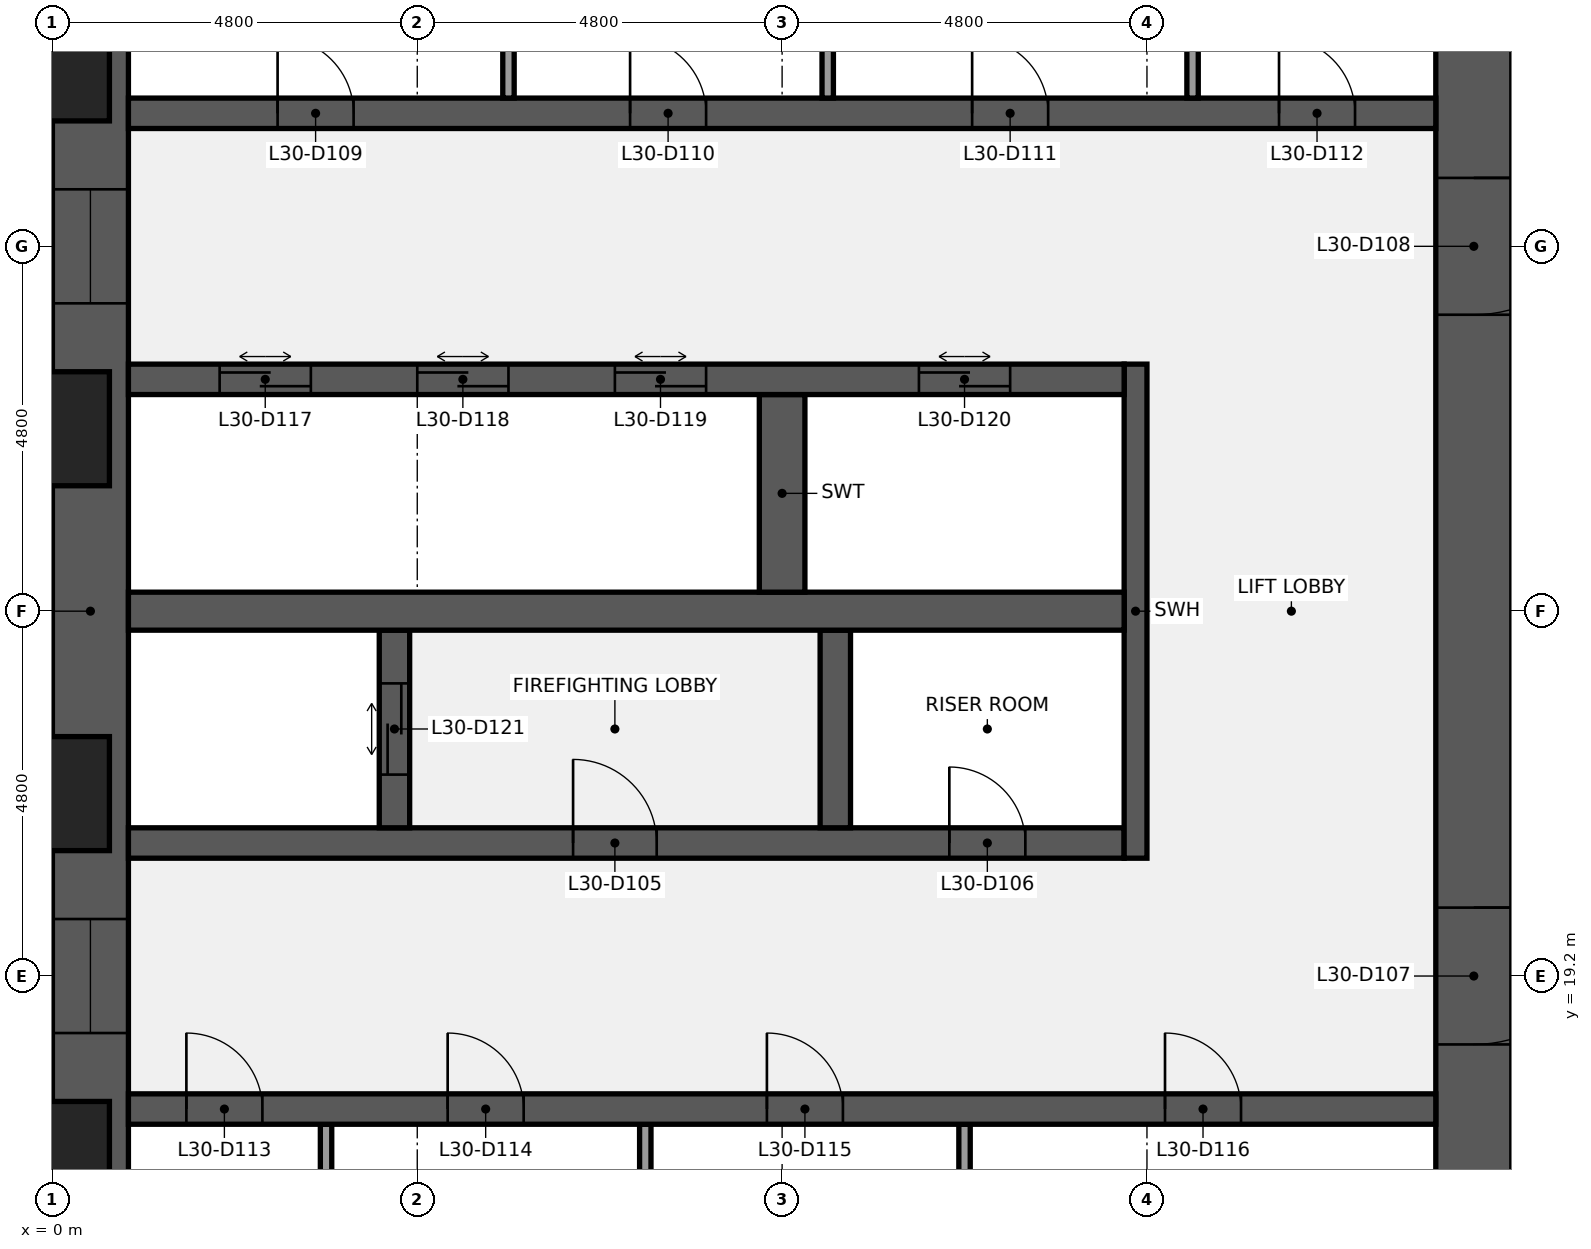
"""IFC4 building model, lengths in metres.
Left out: names, types, materials, properties, quantities, classifications, styles, units other than length and angle.
Written with IfcOpenShell. Run it as: python <this file> out.ifc"""

import sys

from ifc_helpers import new_model, si_unit, direction, frame, frame_2d, origin, place, context, subcontext, project, spatial, rectangle, extrude, element, fill, save


model = new_model("IFC4")
c1 = context("Model", 3, precision=1e-05, world=origin(), true_north=direction((0.0, 1.0)))
c2 = subcontext(c1, "Body", "Model", "MODEL_VIEW")
j1 = project(units=[si_unit("LENGTHUNIT", "METRE"), si_unit("PLANEANGLEUNIT", "RADIAN")], contexts=[c1])
p1 = place(None, origin())
s1 = spatial("IfcSite", under=j1, at=p1, CompositionType="ELEMENT")
p2 = place(p1, origin())
s2 = spatial("IfcBuilding", under=s1, at=p2, CompositionType="ELEMENT")
p3 = place(p2, frame((0.0, 0.0, 140.1)))
s3 = spatial("IfcBuildingStorey", under=s2, at=p3, CompositionType="ELEMENT", Elevation=140.1)
p4 = place(p3, frame((0.5, 9.6, 0.0), z_axis=(0.0, 0.0, 1.0), x_axis=(0.0, 1.0, 0.0)))
e1 = element("IfcWall", 1, at=p4, inside=s3, PredefinedType="SHEAR", context=c2, shape_type="SweptSolid", body=[
    extrude(rectangle(XDim=28.8, YDim=1.0, at=frame_2d((14.4, 0.0))), origin(), (0.0, 0.0, 1.0), 3.84),
])
p5 = place(p4, frame((8.85, 0.0, 0.9)))
e2 = element("IfcOpeningElement", 2, at=p5, cuts=e1, PredefinedType="OPENING", context=c2, shape_type="SweptSolid", body=[
    extrude(rectangle(XDim=1.5, YDim=1.5, at=frame_2d((0.75, 0.75))), frame((0.0, 0.51, 0.0), z_axis=(0.0, -1.0, 0.0), x_axis=(1.0, 0.0, 0.0)), (0.0, 0.0, 1.0), 1.02),
])
p6 = place(p4, frame((18.45, 0.0, 0.9)))
e3 = element("IfcOpeningElement", 3, at=p6, cuts=e1, PredefinedType="OPENING", context=c2, shape_type="SweptSolid", body=[
    extrude(rectangle(XDim=1.5, YDim=1.5, at=frame_2d((0.75, 0.75))), frame((0.0, 0.51, 0.0), z_axis=(0.0, -1.0, 0.0), x_axis=(1.0, 0.0, 0.0)), (0.0, 0.0, 1.0), 1.02),
])
p7 = place(p3, frame((18.7, 38.4, 0.0), z_axis=(0.0, 0.0, 1.0), x_axis=(0.0, -1.0, 0.0)))
e4 = element("IfcWall", 4, at=p7, inside=s3, PredefinedType="SHEAR", context=c2, shape_type="SweptSolid", body=[
    extrude(rectangle(XDim=28.8, YDim=1.0, at=frame_2d((14.4, 0.0))), origin(), (0.0, 0.0, 1.0), 3.84),
])
p8 = place(p7, frame((18.3, 0.0, 0.0)))
e5 = element("IfcOpeningElement", 5, at=p8, cuts=e4, PredefinedType="OPENING", context=c2, shape_type="SweptSolid", body=[
    extrude(rectangle(XDim=1.8, YDim=2.1, at=frame_2d((0.9, 1.05))), frame((0.0, 0.51, 0.0), z_axis=(0.0, -1.0, 0.0), x_axis=(1.0, 0.0, 0.0)), (0.0, 0.0, 1.0), 1.02),
])
p9 = place(p7, frame((8.7, 0.0, 0.0)))
e6 = element("IfcOpeningElement", 6, at=p9, cuts=e4, PredefinedType="OPENING", context=c2, shape_type="SweptSolid", body=[
    extrude(rectangle(XDim=1.8, YDim=2.1, at=frame_2d((0.9, 1.05))), frame((0.0, 0.51, 0.0), z_axis=(0.0, -1.0, 0.0), x_axis=(1.0, 0.0, 0.0)), (0.0, 0.0, 1.0), 1.02),
])
for number, where, z_axis, x_axis in (
    (7, (3.6, 14.65, 0.0), (0.0, 0.0, 1.0), (0.0, 1.0, 0.0)),
    (8, (7.8, 14.65, 0.0), (0.0, 0.0, 1.0), (0.0, 1.0, 0.0)),
    (9, (12.0, 14.65, 0.0), (0.0, 0.0, 1.0), (0.0, 1.0, 0.0)),
):
    element("IfcWall", number, at=place(p3, frame(where, z_axis=z_axis, x_axis=x_axis)), inside=s3, PredefinedType="PARTITIONING", context=c2, shape_type="SweptSolid", body=[
        extrude(rectangle(XDim=2.6, YDim=0.15, at=frame_2d((1.3, 0.0))), origin(), (0.0, 0.0, 1.0), 3.84),
    ])
p10 = place(p3, frame((1.0, 17.45, 0.0), z_axis=(0.0, 0.0, 1.0), x_axis=(1.0, 0.0, 0.0)))
e10 = element("IfcWall", 10, at=p10, inside=s3, PredefinedType="SHEAR", context=c2, shape_type="SweptSolid", body=[
    extrude(rectangle(XDim=17.2, YDim=0.4, at=frame_2d((8.6, 0.0))), origin(), (0.0, 0.0, 1.0), 3.84),
])
p11 = place(p10, frame((0.762, 0.0, 0.0)))
e11 = element("IfcOpeningElement", 11, at=p11, cuts=e10, PredefinedType="OPENING", context=c2, shape_type="SweptSolid", body=[
    extrude(rectangle(XDim=1.0, YDim=2.1, at=frame_2d((0.5, 1.05))), frame((0.0, 0.21, 0.0), z_axis=(0.0, -1.0, 0.0), x_axis=(1.0, 0.0, 0.0)), (0.0, 0.0, 1.0), 0.42),
])
p12 = place(p10, frame((4.2, 0.0, 0.0)))
e12 = element("IfcOpeningElement", 12, at=p12, cuts=e10, PredefinedType="OPENING", context=c2, shape_type="SweptSolid", body=[
    extrude(rectangle(XDim=1.0, YDim=2.1, at=frame_2d((0.5, 1.05))), frame((0.0, 0.21, 0.0), z_axis=(0.0, -1.0, 0.0), x_axis=(1.0, 0.0, 0.0)), (0.0, 0.0, 1.0), 0.42),
])
p13 = place(p10, frame((8.4, 0.0, 0.0)))
e13 = element("IfcOpeningElement", 13, at=p13, cuts=e10, PredefinedType="OPENING", context=c2, shape_type="SweptSolid", body=[
    extrude(rectangle(XDim=1.0, YDim=2.1, at=frame_2d((0.5, 1.05))), frame((0.0, 0.21, 0.0), z_axis=(0.0, -1.0, 0.0), x_axis=(1.0, 0.0, 0.0)), (0.0, 0.0, 1.0), 0.42),
])
p14 = place(p10, frame((13.637, 0.0, 0.0)))
e14 = element("IfcOpeningElement", 14, at=p14, cuts=e10, PredefinedType="OPENING", context=c2, shape_type="SweptSolid", body=[
    extrude(rectangle(XDim=1.0, YDim=2.1, at=frame_2d((0.5, 1.05))), frame((0.0, 0.21, 0.0), z_axis=(0.0, -1.0, 0.0), x_axis=(1.0, 0.0, 0.0)), (0.0, 0.0, 1.0), 0.42),
])
p15 = place(p3, frame((1.0, 20.95, 0.0), z_axis=(0.0, 0.0, 1.0), x_axis=(1.0, 0.0, 0.0)))
e15 = element("IfcWall", 15, at=p15, inside=s3, PredefinedType="SHEAR", context=c2, shape_type="SweptSolid", body=[
    extrude(rectangle(XDim=13.1, YDim=0.4, at=frame_2d((6.55, 0.0))), origin(), (0.0, 0.0, 1.0), 3.84),
])
p16 = place(p15, frame((5.85, 0.0, 0.0)))
e16 = element("IfcOpeningElement", 16, at=p16, cuts=e15, PredefinedType="OPENING", context=c2, shape_type="SweptSolid", body=[
    extrude(rectangle(XDim=1.1, YDim=2.1, at=frame_2d((0.55, 1.05))), frame((0.0, 0.21, 0.0), z_axis=(0.0, -1.0, 0.0), x_axis=(1.0, 0.0, 0.0)), (0.0, 0.0, 1.0), 0.42),
])
p17 = place(p15, frame((10.8, 0.0, 0.0)))
e17 = element("IfcOpeningElement", 17, at=p17, cuts=e15, PredefinedType="OPENING", context=c2, shape_type="SweptSolid", body=[
    extrude(rectangle(XDim=1.0, YDim=2.1, at=frame_2d((0.5, 1.05))), frame((0.0, 0.21, 0.0), z_axis=(0.0, -1.0, 0.0), x_axis=(1.0, 0.0, 0.0)), (0.0, 0.0, 1.0), 0.42),
])
p18 = place(p3, frame((14.25, 20.75, 0.0), z_axis=(0.0, 0.0, 1.0), x_axis=(0.0, 1.0, 0.0)))
e18 = element("IfcWall", 18, at=p18, inside=s3, PredefinedType="SHEAR", context=c2, shape_type="SweptSolid", body=[
    extrude(rectangle(XDim=6.5, YDim=0.3, at=frame_2d((3.25, 0.0))), origin(), (0.0, 0.0, 1.0), 3.84),
])
p19 = place(p3, frame((4.5, 21.15, 0.0), z_axis=(0.0, 0.0, 1.0), x_axis=(0.0, 1.0, 0.0)))
e19 = element("IfcWall", 19, at=p19, inside=s3, PredefinedType="SHEAR", context=c2, shape_type="SweptSolid", body=[
    extrude(rectangle(XDim=2.6, YDim=0.4, at=frame_2d((1.3, 0.0))), origin(), (0.0, 0.0, 1.0), 3.84),
])
p20 = place(p19, frame((0.7, 0.0, 0.0)))
e20 = element("IfcOpeningElement", 20, at=p20, cuts=e19, PredefinedType="OPENING", context=c2, shape_type="SweptSolid", body=[
    extrude(rectangle(XDim=1.2, YDim=2.1, at=frame_2d((0.6, 1.05))), frame((0.0, 0.21, 0.0), z_axis=(0.0, -1.0, 0.0), x_axis=(1.0, 0.0, 0.0)), (0.0, 0.0, 1.0), 0.42),
])
p21 = place(p3, frame((10.3, 21.15, 0.0), z_axis=(0.0, 0.0, 1.0), x_axis=(0.0, 1.0, 0.0)))
e21 = element("IfcWall", 21, at=p21, inside=s3, PredefinedType="SHEAR", context=c2, shape_type="SweptSolid", body=[
    extrude(rectangle(XDim=2.6, YDim=0.4, at=frame_2d((1.3, 0.0))), origin(), (0.0, 0.0, 1.0), 3.84),
])
p22 = place(p3, frame((1.0, 24.0, 0.0), z_axis=(0.0, 0.0, 1.0), x_axis=(1.0, 0.0, 0.0)))
e22 = element("IfcWall", 22, at=p22, inside=s3, PredefinedType="SHEAR", context=c2, shape_type="SweptSolid", body=[
    extrude(rectangle(XDim=13.1, YDim=0.5, at=frame_2d((6.55, 0.0))), origin(), (0.0, 0.0, 1.0), 3.84),
])
p23 = place(p3, frame((9.6, 24.25, 0.0), z_axis=(0.0, 0.0, 1.0), x_axis=(0.0, 1.0, 0.0)))
e23 = element("IfcWall", 23, at=p23, inside=s3, PredefinedType="SHEAR", context=c2, shape_type="SweptSolid", body=[
    extrude(rectangle(XDim=2.6, YDim=0.6, at=frame_2d((1.3, 0.0))), origin(), (0.0, 0.0, 1.0), 3.84),
])
p24 = place(p3, frame((1.0, 27.05, 0.0), z_axis=(0.0, 0.0, 1.0), x_axis=(1.0, 0.0, 0.0)))
e24 = element("IfcWall", 24, at=p24, inside=s3, PredefinedType="SHEAR", context=c2, shape_type="SweptSolid", body=[
    extrude(rectangle(XDim=13.1, YDim=0.4, at=frame_2d((6.55, 0.0))), origin(), (0.0, 0.0, 1.0), 3.84),
])
p25 = place(p24, frame((1.2, 0.0, 0.0)))
e25 = element("IfcOpeningElement", 25, at=p25, cuts=e24, PredefinedType="OPENING", context=c2, shape_type="SweptSolid", body=[
    extrude(rectangle(XDim=1.2, YDim=2.1, at=frame_2d((0.6, 1.05))), frame((0.0, 0.21, 0.0), z_axis=(0.0, -1.0, 0.0), x_axis=(1.0, 0.0, 0.0)), (0.0, 0.0, 1.0), 0.42),
])
p26 = place(p24, frame((3.8, 0.0, 0.0)))
e26 = element("IfcOpeningElement", 26, at=p26, cuts=e24, PredefinedType="OPENING", context=c2, shape_type="SweptSolid", body=[
    extrude(rectangle(XDim=1.2, YDim=2.1, at=frame_2d((0.6, 1.05))), frame((0.0, 0.21, 0.0), z_axis=(0.0, -1.0, 0.0), x_axis=(1.0, 0.0, 0.0)), (0.0, 0.0, 1.0), 0.42),
])
p27 = place(p24, frame((6.4, 0.0, 0.0)))
e27 = element("IfcOpeningElement", 27, at=p27, cuts=e24, PredefinedType="OPENING", context=c2, shape_type="SweptSolid", body=[
    extrude(rectangle(XDim=1.2, YDim=2.1, at=frame_2d((0.6, 1.05))), frame((0.0, 0.21, 0.0), z_axis=(0.0, -1.0, 0.0), x_axis=(1.0, 0.0, 0.0)), (0.0, 0.0, 1.0), 0.42),
])
p28 = place(p24, frame((10.4, 0.0, 0.0)))
e28 = element("IfcOpeningElement", 28, at=p28, cuts=e24, PredefinedType="OPENING", context=c2, shape_type="SweptSolid", body=[
    extrude(rectangle(XDim=1.2, YDim=2.1, at=frame_2d((0.6, 1.05))), frame((0.0, 0.21, 0.0), z_axis=(0.0, -1.0, 0.0), x_axis=(1.0, 0.0, 0.0)), (0.0, 0.0, 1.0), 0.42),
])
p29 = place(p3, frame((1.0, 30.55, 0.0), z_axis=(0.0, 0.0, 1.0), x_axis=(1.0, 0.0, 0.0)))
e29 = element("IfcWall", 29, at=p29, inside=s3, PredefinedType="SHEAR", context=c2, shape_type="SweptSolid", body=[
    extrude(rectangle(XDim=17.2, YDim=0.4, at=frame_2d((8.6, 0.0))), origin(), (0.0, 0.0, 1.0), 3.84),
])
p30 = place(p29, frame((1.962, 0.0, 0.0)))
e30 = element("IfcOpeningElement", 30, at=p30, cuts=e29, PredefinedType="OPENING", context=c2, shape_type="SweptSolid", body=[
    extrude(rectangle(XDim=1.0, YDim=2.1, at=frame_2d((0.5, 1.05))), frame((0.0, 0.21, 0.0), z_axis=(0.0, -1.0, 0.0), x_axis=(1.0, 0.0, 0.0)), (0.0, 0.0, 1.0), 0.42),
])
p31 = place(p29, frame((6.6, 0.0, 0.0)))
e31 = element("IfcOpeningElement", 31, at=p31, cuts=e29, PredefinedType="OPENING", context=c2, shape_type="SweptSolid", body=[
    extrude(rectangle(XDim=1.0, YDim=2.1, at=frame_2d((0.5, 1.05))), frame((0.0, 0.21, 0.0), z_axis=(0.0, -1.0, 0.0), x_axis=(1.0, 0.0, 0.0)), (0.0, 0.0, 1.0), 0.42),
])
p32 = place(p29, frame((11.1, 0.0, 0.0)))
e32 = element("IfcOpeningElement", 32, at=p32, cuts=e29, PredefinedType="OPENING", context=c2, shape_type="SweptSolid", body=[
    extrude(rectangle(XDim=1.0, YDim=2.1, at=frame_2d((0.5, 1.05))), frame((0.0, 0.21, 0.0), z_axis=(0.0, -1.0, 0.0), x_axis=(1.0, 0.0, 0.0)), (0.0, 0.0, 1.0), 0.42),
])
p33 = place(p29, frame((15.137, 0.0, 0.0)))
e33 = element("IfcOpeningElement", 33, at=p33, cuts=e29, PredefinedType="OPENING", context=c2, shape_type="SweptSolid", body=[
    extrude(rectangle(XDim=1.0, YDim=2.1, at=frame_2d((0.5, 1.05))), frame((0.0, 0.21, 0.0), z_axis=(0.0, -1.0, 0.0), x_axis=(1.0, 0.0, 0.0)), (0.0, 0.0, 1.0), 0.42),
])
for number, where, z_axis, x_axis in (
    (34, (6.0, 30.75, 0.0), (0.0, 0.0, 1.0), (0.0, 1.0, 0.0)),
    (35, (10.2, 30.75, 0.0), (0.0, 0.0, 1.0), (0.0, 1.0, 0.0)),
    (36, (15.0, 30.75, 0.0), (0.0, 0.0, 1.0), (0.0, 1.0, 0.0)),
):
    element("IfcWall", number, at=place(p3, frame(where, z_axis=z_axis, x_axis=x_axis)), inside=s3, PredefinedType="PARTITIONING", context=c2, shape_type="SweptSolid", body=[
        extrude(rectangle(XDim=2.6, YDim=0.15, at=frame_2d((1.3, 0.0))), origin(), (0.0, 0.0, 1.0), 3.84),
    ])
p34 = place(p16, origin())
e37 = element("IfcDoor", 37, at=p34, inside=s3, OperationType="SINGLE_SWING_LEFT", PredefinedType="DOOR", context=c2, shape_type="SweptSolid", body=[
    extrude(rectangle(XDim=1.1, YDim=2.1, at=frame_2d((0.55, 1.05))), frame((0.0, 0.025, 0.0), z_axis=(0.0, -1.0, 0.0), x_axis=(1.0, 0.0, 0.0)), (0.0, 0.0, 1.0), 0.05),
])
fill(e16, e37)
p35 = place(p17, origin())
e38 = element("IfcDoor", 38, at=p35, inside=s3, OperationType="SINGLE_SWING_LEFT", PredefinedType="DOOR", context=c2, shape_type="SweptSolid", body=[
    extrude(rectangle(XDim=1.0, YDim=2.1, at=frame_2d((0.5, 1.05))), frame((0.0, 0.025, 0.0), z_axis=(0.0, -1.0, 0.0), x_axis=(1.0, 0.0, 0.0)), (0.0, 0.0, 1.0), 0.05),
])
fill(e17, e38)
p36 = place(p8, origin())
e39 = element("IfcDoor", 39, at=p36, inside=s3, OperationType="DOUBLE_DOOR_SINGLE_SWING", PredefinedType="DOOR", context=c2, shape_type="SweptSolid", body=[
    extrude(rectangle(XDim=1.8, YDim=2.1, at=frame_2d((0.9, 1.05))), frame((0.0, 0.025, 0.0), z_axis=(0.0, -1.0, 0.0), x_axis=(1.0, 0.0, 0.0)), (0.0, 0.0, 1.0), 0.05),
])
fill(e5, e39)
p37 = place(p9, origin())
e40 = element("IfcDoor", 40, at=p37, inside=s3, OperationType="DOUBLE_DOOR_SINGLE_SWING", PredefinedType="DOOR", context=c2, shape_type="SweptSolid", body=[
    extrude(rectangle(XDim=1.8, YDim=2.1, at=frame_2d((0.9, 1.05))), frame((0.0, 0.025, 0.0), z_axis=(0.0, -1.0, 0.0), x_axis=(1.0, 0.0, 0.0)), (0.0, 0.0, 1.0), 0.05),
])
fill(e6, e40)
p38 = place(p30, origin())
e41 = element("IfcDoor", 41, at=p38, inside=s3, OperationType="SINGLE_SWING_LEFT", PredefinedType="DOOR", context=c2, shape_type="SweptSolid", body=[
    extrude(rectangle(XDim=1.0, YDim=2.1, at=frame_2d((0.5, 1.05))), frame((0.0, 0.025, 0.0), z_axis=(0.0, -1.0, 0.0), x_axis=(1.0, 0.0, 0.0)), (0.0, 0.0, 1.0), 0.05),
])
fill(e30, e41)
p39 = place(p31, origin())
e42 = element("IfcDoor", 42, at=p39, inside=s3, OperationType="SINGLE_SWING_LEFT", PredefinedType="DOOR", context=c2, shape_type="SweptSolid", body=[
    extrude(rectangle(XDim=1.0, YDim=2.1, at=frame_2d((0.5, 1.05))), frame((0.0, 0.025, 0.0), z_axis=(0.0, -1.0, 0.0), x_axis=(1.0, 0.0, 0.0)), (0.0, 0.0, 1.0), 0.05),
])
fill(e31, e42)
p40 = place(p32, origin())
e43 = element("IfcDoor", 43, at=p40, inside=s3, OperationType="SINGLE_SWING_LEFT", PredefinedType="DOOR", context=c2, shape_type="SweptSolid", body=[
    extrude(rectangle(XDim=1.0, YDim=2.1, at=frame_2d((0.5, 1.05))), frame((0.0, 0.025, 0.0), z_axis=(0.0, -1.0, 0.0), x_axis=(1.0, 0.0, 0.0)), (0.0, 0.0, 1.0), 0.05),
])
fill(e32, e43)
p41 = place(p33, origin())
e44 = element("IfcDoor", 44, at=p41, inside=s3, OperationType="SINGLE_SWING_LEFT", PredefinedType="DOOR", context=c2, shape_type="SweptSolid", body=[
    extrude(rectangle(XDim=1.0, YDim=2.1, at=frame_2d((0.5, 1.05))), frame((0.0, 0.025, 0.0), z_axis=(0.0, -1.0, 0.0), x_axis=(1.0, 0.0, 0.0)), (0.0, 0.0, 1.0), 0.05),
])
fill(e33, e44)
p42 = place(p11, origin())
e45 = element("IfcDoor", 45, at=p42, inside=s3, OperationType="SINGLE_SWING_LEFT", PredefinedType="DOOR", context=c2, shape_type="SweptSolid", body=[
    extrude(rectangle(XDim=1.0, YDim=2.1, at=frame_2d((0.5, 1.05))), frame((0.0, 0.025, 0.0), z_axis=(0.0, -1.0, 0.0), x_axis=(1.0, 0.0, 0.0)), (0.0, 0.0, 1.0), 0.05),
])
fill(e11, e45)
p43 = place(p12, origin())
e46 = element("IfcDoor", 46, at=p43, inside=s3, OperationType="SINGLE_SWING_LEFT", PredefinedType="DOOR", context=c2, shape_type="SweptSolid", body=[
    extrude(rectangle(XDim=1.0, YDim=2.1, at=frame_2d((0.5, 1.05))), frame((0.0, 0.025, 0.0), z_axis=(0.0, -1.0, 0.0), x_axis=(1.0, 0.0, 0.0)), (0.0, 0.0, 1.0), 0.05),
])
fill(e12, e46)
p44 = place(p13, origin())
e47 = element("IfcDoor", 47, at=p44, inside=s3, OperationType="SINGLE_SWING_LEFT", PredefinedType="DOOR", context=c2, shape_type="SweptSolid", body=[
    extrude(rectangle(XDim=1.0, YDim=2.1, at=frame_2d((0.5, 1.05))), frame((0.0, 0.025, 0.0), z_axis=(0.0, -1.0, 0.0), x_axis=(1.0, 0.0, 0.0)), (0.0, 0.0, 1.0), 0.05),
])
fill(e13, e47)
p45 = place(p14, origin())
e48 = element("IfcDoor", 48, at=p45, inside=s3, OperationType="SINGLE_SWING_LEFT", PredefinedType="DOOR", context=c2, shape_type="SweptSolid", body=[
    extrude(rectangle(XDim=1.0, YDim=2.1, at=frame_2d((0.5, 1.05))), frame((0.0, 0.025, 0.0), z_axis=(0.0, -1.0, 0.0), x_axis=(1.0, 0.0, 0.0)), (0.0, 0.0, 1.0), 0.05),
])
fill(e14, e48)
p46 = place(p25, origin())
e49 = element("IfcDoor", 49, at=p46, inside=s3, OperationType="DOUBLE_DOOR_SLIDING", PredefinedType="DOOR", context=c2, shape_type="SweptSolid", body=[
    extrude(rectangle(XDim=1.2, YDim=2.1, at=frame_2d((0.6, 1.05))), frame((0.0, 0.025, 0.0), z_axis=(0.0, -1.0, 0.0), x_axis=(1.0, 0.0, 0.0)), (0.0, 0.0, 1.0), 0.05),
])
fill(e25, e49)
p47 = place(p26, origin())
e50 = element("IfcDoor", 50, at=p47, inside=s3, OperationType="DOUBLE_DOOR_SLIDING", PredefinedType="DOOR", context=c2, shape_type="SweptSolid", body=[
    extrude(rectangle(XDim=1.2, YDim=2.1, at=frame_2d((0.6, 1.05))), frame((0.0, 0.025, 0.0), z_axis=(0.0, -1.0, 0.0), x_axis=(1.0, 0.0, 0.0)), (0.0, 0.0, 1.0), 0.05),
])
fill(e26, e50)
p48 = place(p27, origin())
e51 = element("IfcDoor", 51, at=p48, inside=s3, OperationType="DOUBLE_DOOR_SLIDING", PredefinedType="DOOR", context=c2, shape_type="SweptSolid", body=[
    extrude(rectangle(XDim=1.2, YDim=2.1, at=frame_2d((0.6, 1.05))), frame((0.0, 0.025, 0.0), z_axis=(0.0, -1.0, 0.0), x_axis=(1.0, 0.0, 0.0)), (0.0, 0.0, 1.0), 0.05),
])
fill(e27, e51)
p49 = place(p28, origin())
e52 = element("IfcDoor", 52, at=p49, inside=s3, OperationType="DOUBLE_DOOR_SLIDING", PredefinedType="DOOR", context=c2, shape_type="SweptSolid", body=[
    extrude(rectangle(XDim=1.2, YDim=2.1, at=frame_2d((0.6, 1.05))), frame((0.0, 0.025, 0.0), z_axis=(0.0, -1.0, 0.0), x_axis=(1.0, 0.0, 0.0)), (0.0, 0.0, 1.0), 0.05),
])
fill(e28, e52)
p50 = place(p20, origin())
e53 = element("IfcDoor", 53, at=p50, inside=s3, OperationType="DOUBLE_DOOR_SLIDING", PredefinedType="DOOR", context=c2, shape_type="SweptSolid", body=[
    extrude(rectangle(XDim=1.2, YDim=2.1, at=frame_2d((0.6, 1.05))), frame((0.0, 0.025, 0.0), z_axis=(0.0, -1.0, 0.0), x_axis=(1.0, 0.0, 0.0)), (0.0, 0.0, 1.0), 0.05),
])
fill(e20, e53)
p51 = place(p5, origin())
e54 = element("IfcWindow", 54, at=p51, inside=s3, PartitioningType="SINGLE_PANEL", PredefinedType="WINDOW", context=c2, shape_type="SweptSolid", body=[
    extrude(rectangle(XDim=1.5, YDim=1.5, at=frame_2d((0.75, 0.75))), frame((0.0, 0.03, 0.0), z_axis=(0.0, -1.0, 0.0), x_axis=(1.0, 0.0, 0.0)), (0.0, 0.0, 1.0), 0.06),
])
fill(e2, e54)
p52 = place(p6, origin())
e55 = element("IfcWindow", 55, at=p52, inside=s3, PartitioningType="SINGLE_PANEL", PredefinedType="WINDOW", context=c2, shape_type="SweptSolid", body=[
    extrude(rectangle(XDim=1.5, YDim=1.5, at=frame_2d((0.75, 0.75))), frame((0.0, 0.03, 0.0), z_axis=(0.0, -1.0, 0.0), x_axis=(1.0, 0.0, 0.0)), (0.0, 0.0, 1.0), 0.06),
])
fill(e3, e55)
save(model, sys.argv[1])
